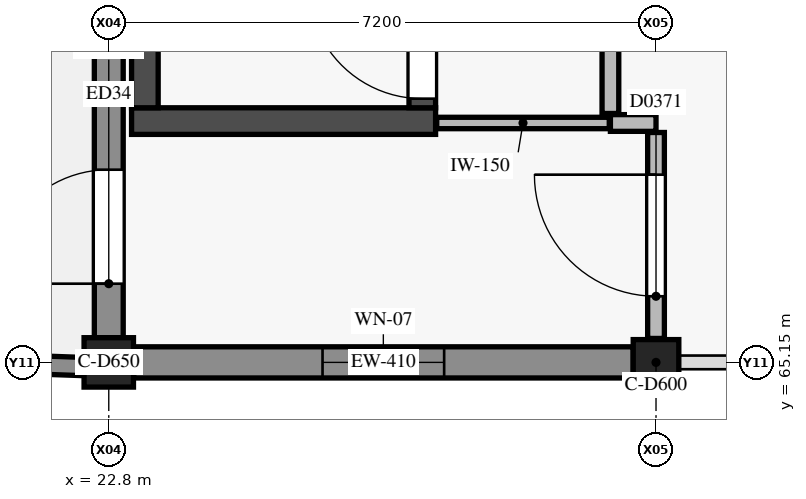
"""IFC4 building model, lengths in metres.
Left out: names, types, materials, properties, quantities, classifications, styles, units other than length and angle.
Written with IfcOpenShell. Run it as: python <this file> out.ifc"""

import sys

from ifc_helpers import new_model, si_unit, direction, frame, frame_2d, origin, origin_2d, place, context, subcontext, project, spatial, rectangle, circle, extrude, element, fill, save


model = new_model("IFC4")
c1 = context("Model", 3, precision=1e-05, world=origin(), true_north=direction((0.0, 1.0)))
c2 = subcontext(c1, "Body", "Model", "MODEL_VIEW")
j1 = project(units=[si_unit("LENGTHUNIT", "METRE"), si_unit("PLANEANGLEUNIT", "RADIAN")], contexts=[c1])
p1 = place(None, origin())
s1 = spatial("IfcSite", under=j1, at=p1, CompositionType="ELEMENT")
p2 = place(p1, origin())
s2 = spatial("IfcBuilding", under=s1, at=p2, CompositionType="ELEMENT")
p3 = place(p2, frame((0.0, 0.0, 9.0)))
s3 = spatial("IfcBuildingStorey", under=s2, at=p3, CompositionType="ELEMENT", Elevation=9.0)
p4 = place(p3, frame((22.8, 65.15, 0.0), z_axis=(0.0, 0.0, 1.0), x_axis=(1.0, 0.0, 0.0)))
e1 = element("IfcColumn", 1, at=p4, inside=s3, PredefinedType="COLUMN", context=c2, shape_type="SweptSolid", body=[
    extrude(circle(Radius=0.325, at=origin_2d()), origin(), (0.0, 0.0, 1.0), 4.05),
])
p5 = place(p3, frame((30.0, 65.15, 0.0), z_axis=(0.0, 0.0, 1.0), x_axis=(1.0, 0.0, 0.0)))
e2 = element("IfcColumn", 2, at=p5, inside=s3, PredefinedType="COLUMN", context=c2, shape_type="SweptSolid", body=[
    extrude(circle(Radius=0.3, at=origin_2d()), origin(), (0.0, 0.0, 1.0), 4.05),
])
p6 = place(p3, frame((23.1, 68.325, 0.0), z_axis=(0.0, 0.0, 1.0), x_axis=(1.0, 0.0, 0.0)))
e3 = element("IfcWall", 3, at=p6, inside=s3, PredefinedType="SHEAR", context=c2, shape_type="SweptSolid", body=[
    extrude(rectangle(XDim=4.0, YDim=0.35, at=frame_2d((2.0, 0.0))), origin(), (0.0, 0.0, 1.0), 3.95),
])
p7 = place(p3, frame((23.275, 68.5, 0.0), z_axis=(0.0, 0.0, 1.0), x_axis=(0.0, 1.0, 0.0)))
e4 = element("IfcWall", 4, at=p7, inside=s3, PredefinedType="SHEAR", context=c2, shape_type="SweptSolid", body=[
    extrude(rectangle(XDim=7.3, YDim=0.35, at=frame_2d((3.65, 0.0))), origin(), (0.0, 0.0, 1.0), 3.95),
])
p8 = place(p3, frame((26.925, 68.5, 0.0), z_axis=(0.0, 0.0, 1.0), x_axis=(0.0, 1.0, 0.0)))
e5 = element("IfcWall", 5, at=p8, inside=s3, PredefinedType="SHEAR", context=c2, shape_type="SweptSolid", body=[
    extrude(rectangle(XDim=7.3, YDim=0.35, at=frame_2d((3.65, 0.0))), origin(), (0.0, 0.0, 1.0), 3.95),
])
p9 = place(p8, frame((0.12, 0.0, 0.0)))
e6 = element("IfcOpeningElement", 6, at=p9, cuts=e5, PredefinedType="OPENING", context=c2, shape_type="SweptSolid", body=[
    extrude(rectangle(XDim=1.5, YDim=2.15, at=frame_2d((0.75, 1.075))), frame((0.0, 0.185, 0.0), z_axis=(0.0, -1.0, 0.0), x_axis=(1.0, 0.0, 0.0)), (0.0, 0.0, 1.0), 0.37),
])
p10 = place(p3, frame((29.7, 65.15, 0.0), z_axis=(0.0, 0.0, 1.0), x_axis=(-1.0, 0.0, 0.0)))
e7 = element("IfcWall", 7, at=p10, inside=s3, PredefinedType="USERDEFINED", context=c2, shape_type="SweptSolid", body=[
    extrude(rectangle(XDim=6.575, YDim=0.41, at=frame_2d((3.288, 0.0))), origin(), (0.0, 0.0, 1.0), 3.13),
])
p11 = place(p10, frame((2.488, 0.0, 0.9)))
e8 = element("IfcOpeningElement", 8, at=p11, cuts=e7, PredefinedType="OPENING", context=c2, shape_type="SweptSolid", body=[
    extrude(rectangle(XDim=1.6, YDim=1.8, at=frame_2d((0.8, 0.9))), frame((0.0, 0.215, 0.0), z_axis=(0.0, -1.0, 0.0), x_axis=(1.0, 0.0, 0.0)), (0.0, 0.0, 1.0), 0.43),
])
p12 = place(p3, frame((22.8, 65.475, 0.0), z_axis=(0.0, 0.0, 1.0), x_axis=(0.0, 1.0, 0.0)))
e9 = element("IfcWall", 9, at=p12, inside=s3, PredefinedType="USERDEFINED", context=c2, shape_type="SweptSolid", body=[
    extrude(rectangle(XDim=6.575, YDim=0.38, at=frame_2d((3.288, 0.0))), origin(), (0.0, 0.0, 1.0), 3.13),
])
p13 = place(p12, frame((0.71, 0.0, 0.0)))
e10 = element("IfcOpeningElement", 10, at=p13, cuts=e9, PredefinedType="OPENING", context=c2, shape_type="SweptSolid", body=[
    extrude(rectangle(XDim=1.5, YDim=2.2, at=frame_2d((0.75, 1.1))), frame((0.0, 0.2, 0.0), z_axis=(0.0, -1.0, 0.0), x_axis=(1.0, 0.0, 0.0)), (0.0, 0.0, 1.0), 0.4),
])
p14 = place(p3, frame((15.78, 65.33, 0.0), z_axis=(0.0, 0.0, 1.0), x_axis=(0.999385059583, -0.035064265038, 0.0)))
e11 = element("IfcWall", 11, at=p14, inside=s3, PredefinedType="PARAPET", context=c2, shape_type="SweptSolid", body=[
    extrude(rectangle(XDim=6.844, YDim=0.24, at=frame_2d((3.422, 0.0))), origin(), (0.0, 0.0, 1.0), 1.12),
])
p15 = place(p3, frame((29.4, 68.3, 0.0), z_axis=(0.0, 0.0, 1.0), x_axis=(1.0, 0.0, 0.0)))
e12 = element("IfcWall", 12, at=p15, inside=s3, PredefinedType="PARTITIONING", context=c2, shape_type="SweptSolid", body=[
    extrude(rectangle(XDim=0.6, YDim=0.22, at=frame_2d((0.3, 0.0))), origin(), (0.0, 0.0, 1.0), 3.355),
])
p16 = place(p3, frame((29.4, 68.425, 0.0), z_axis=(0.0, 0.0, 1.0), x_axis=(0.0, 1.0, 0.0)))
e13 = element("IfcWall", 13, at=p16, inside=s3, PredefinedType="PARTITIONING", context=c2, shape_type="SweptSolid", body=[
    extrude(rectangle(XDim=1.575, YDim=0.22, at=frame_2d((0.788, 0.0))), origin(), (0.0, 0.0, 1.0), 3.95),
])
p17 = place(p3, frame((27.115, 68.3, 0.0), z_axis=(0.0, 0.0, 1.0), x_axis=(1.0, 0.0, 0.0)))
e14 = element("IfcWall", 14, at=p17, inside=s3, PredefinedType="PARTITIONING", context=c2, shape_type="SweptSolid", body=[
    extrude(rectangle(XDim=2.27, YDim=0.15, at=frame_2d((1.135, 0.0))), origin(), (0.0, 0.0, 1.0), 3.95),
])
p18 = place(p3, frame((30.0, 65.465, 0.0), z_axis=(0.0, 0.0, 1.0), x_axis=(0.0, 1.0, 0.0)))
e15 = element("IfcWall", 15, at=p18, inside=s3, PredefinedType="PARTITIONING", context=c2, shape_type="SweptSolid", body=[
    extrude(rectangle(XDim=2.71, YDim=0.22, at=frame_2d((1.355, 0.0))), origin(), (0.0, 0.0, 1.0), 3.355),
])
p19 = place(p18, frame((0.555, 0.0, 0.0)))
e16 = element("IfcOpeningElement", 16, at=p19, cuts=e15, PredefinedType="OPENING", context=c2, shape_type="SweptSolid", body=[
    extrude(rectangle(XDim=1.6, YDim=2.25, at=frame_2d((0.8, 1.125))), frame((0.0, 0.12, 0.0), z_axis=(0.0, -1.0, 0.0), x_axis=(1.0, 0.0, 0.0)), (0.0, 0.0, 1.0), 0.24),
])
p20 = place(p11, origin())
e17 = element("IfcWindow", 17, at=p20, inside=s3, PartitioningType="SINGLE_PANEL", PredefinedType="WINDOW", context=c2, shape_type="SweptSolid", body=[
    extrude(rectangle(XDim=1.6, YDim=1.8, at=frame_2d((0.8, 0.9))), frame((0.0, 0.03, 0.0), z_axis=(0.0, -1.0, 0.0), x_axis=(1.0, 0.0, 0.0)), (0.0, 0.0, 1.0), 0.06),
])
fill(e8, e17)
p21 = place(p13, origin())
e18 = element("IfcDoor", 18, at=p21, inside=s3, OperationType="SINGLE_SWING_LEFT", PredefinedType="DOOR", context=c2, shape_type="SweptSolid", body=[
    extrude(rectangle(XDim=1.5, YDim=2.2, at=frame_2d((0.75, 1.1))), frame((0.0, 0.025, 0.0), z_axis=(0.0, -1.0, 0.0), x_axis=(1.0, 0.0, 0.0)), (0.0, 0.0, 1.0), 0.05),
])
fill(e10, e18)
p22 = place(p9, origin())
e19 = element("IfcDoor", 19, at=p22, inside=s3, OperationType="SINGLE_SWING_RIGHT", PredefinedType="DOOR", context=c2, shape_type="SweptSolid", body=[
    extrude(rectangle(XDim=1.5, YDim=2.15, at=frame_2d((0.75, 1.075))), frame((0.0, 0.025, 0.0), z_axis=(0.0, -1.0, 0.0), x_axis=(1.0, 0.0, 0.0)), (0.0, 0.0, 1.0), 0.05),
])
fill(e6, e19)
p23 = place(p19, origin())
e20 = element("IfcDoor", 20, at=p23, inside=s3, OperationType="SINGLE_SWING_RIGHT", PredefinedType="DOOR", context=c2, shape_type="SweptSolid", body=[
    extrude(rectangle(XDim=1.6, YDim=2.25, at=frame_2d((0.8, 1.125))), frame((0.0, 0.025, 0.0), z_axis=(0.0, -1.0, 0.0), x_axis=(1.0, 0.0, 0.0)), (0.0, 0.0, 1.0), 0.05),
])
fill(e16, e20)
save(model, sys.argv[1])
